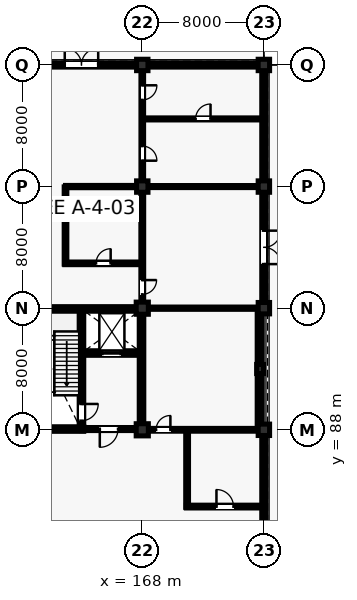
"""IFC4 building model, lengths in metres.
Left out: names, types, materials, properties, quantities, classifications, styles, units other than length and angle.
Written with IfcOpenShell. Run it as: python <this file> out.ifc"""

import sys

from ifc_helpers import new_model, si_unit, direction, frame, frame_2d, origin, origin_2d, place, context, subcontext, project, spatial, rectangle, extrude, element, fill, save


model = new_model("IFC4")
c1 = context("Model", 3, precision=1e-05, world=origin(), true_north=direction((0.0, 1.0)))
c2 = subcontext(c1, "Body", "Model", "MODEL_VIEW")
j1 = project(units=[si_unit("LENGTHUNIT", "METRE"), si_unit("PLANEANGLEUNIT", "RADIAN")], contexts=[c1])
p1 = place(None, origin())
s1 = spatial("IfcSite", under=j1, at=p1, CompositionType="ELEMENT")
p2 = place(p1, origin())
s2 = spatial("IfcBuilding", under=s1, at=p2, CompositionType="ELEMENT")
p3 = place(p2, origin())
s3 = spatial("IfcBuildingStorey", under=s2, at=p3, CompositionType="ELEMENT", Elevation=0.0)
for number, where, z_axis, x_axis in (
    (1, (168.0, 88.0, 0.0), (0.0, 0.0, 1.0), (1.0, 0.0, 0.0)),
    (2, (168.0, 96.0, 0.0), (0.0, 0.0, 1.0), (1.0, 0.0, 0.0)),
):
    element("IfcColumn", number, at=place(p3, frame(where, z_axis=z_axis, x_axis=x_axis)), inside=s3, PredefinedType="COLUMN", context=c2, shape_type="SweptSolid", body=[
        extrude(rectangle(XDim=0.8, YDim=0.8, at=origin_2d()), origin(), (0.0, 0.0, 1.0), 5.28),
    ])
for number, where, z_axis, x_axis in (
    (3, (168.0, 104.0, 0.0), (0.0, 0.0, 1.0), (1.0, 0.0, 0.0)),
    (4, (168.0, 112.0, 0.0), (0.0, 0.0, 1.0), (1.0, 0.0, 0.0)),
    (5, (176.0, 88.0, 0.0), (0.0, 0.0, 1.0), (1.0, 0.0, 0.0)),
    (6, (176.0, 96.0, 0.0), (0.0, 0.0, 1.0), (1.0, 0.0, 0.0)),
    (7, (176.0, 104.0, 0.0), (0.0, 0.0, 1.0), (1.0, 0.0, 0.0)),
    (8, (176.0, 112.0, 0.0), (0.0, 0.0, 1.0), (1.0, 0.0, 0.0)),
):
    element("IfcColumn", number, at=place(p3, frame(where, z_axis=z_axis, x_axis=x_axis)), inside=s3, PredefinedType="COLUMN", context=c2, shape_type="SweptSolid", body=[
        extrude(rectangle(XDim=0.75, YDim=0.75, at=origin_2d()), origin(), (0.0, 0.0, 1.0), 5.28),
    ])
p4 = place(p3, frame((175.75, 92.0, 0.0), z_axis=(0.0, 0.0, 1.0), x_axis=(1.0, 0.0, 0.0)))
e9 = element("IfcColumn", 9, at=p4, inside=s3, PredefinedType="PILASTER", context=c2, shape_type="SweptSolid", body=[
    extrude(rectangle(XDim=0.45, YDim=0.6, at=origin_2d()), origin(), (0.0, 0.0, 1.0), 5.28),
])
p5 = place(p3, frame((160.36, 112.0, 0.0), z_axis=(0.0, 0.0, 1.0), x_axis=(1.0, 0.0, 0.0)))
e10 = element("IfcWall", 10, at=p5, inside=s3, PredefinedType="SOLIDWALL", context=c2, shape_type="SweptSolid", body=[
    extrude(rectangle(XDim=7.28, YDim=0.28, at=frame_2d((3.64, 0.0))), origin(), (0.0, 0.0, 1.0), 4.614),
])
p6 = place(p5, frame((2.54, 0.0, 0.0)))
e11 = element("IfcOpeningElement", 11, at=p6, cuts=e10, PredefinedType="OPENING", context=c2, shape_type="SweptSolid", body=[
    extrude(rectangle(XDim=2.2, YDim=2.5, at=frame_2d((1.1, 1.25))), frame((0.0, 0.15, 0.0), z_axis=(0.0, -1.0, 0.0), x_axis=(1.0, 0.0, 0.0)), (0.0, 0.0, 1.0), 0.3),
])
p7 = place(p3, frame((176.0, 80.36, 0.0), z_axis=(0.0, 0.0, 1.0), x_axis=(0.0, 1.0, 0.0)))
e12 = element("IfcWall", 12, at=p7, inside=s3, PredefinedType="SOLIDWALL", context=c2, shape_type="SweptSolid", body=[
    extrude(rectangle(XDim=7.28, YDim=0.28, at=frame_2d((3.64, 0.0))), origin(), (0.0, 0.0, 1.0), 4.61),
])
p8 = place(p7, frame((0.635, 0.0, 0.95)))
e13 = element("IfcOpeningElement", 13, at=p8, cuts=e12, PredefinedType="OPENING", context=c2, shape_type="SweptSolid", body=[
    extrude(rectangle(XDim=1.35, YDim=1.9, at=frame_2d((0.675, 0.95))), frame((0.0, 0.15, 0.0), z_axis=(0.0, -1.0, 0.0), x_axis=(1.0, 0.0, 0.0)), (0.0, 0.0, 1.0), 0.3),
])
p9 = place(p7, frame((5.295, 0.0, 0.95)))
e14 = element("IfcOpeningElement", 14, at=p9, cuts=e12, PredefinedType="OPENING", context=c2, shape_type="SweptSolid", body=[
    extrude(rectangle(XDim=1.35, YDim=1.9, at=frame_2d((0.675, 0.95))), frame((0.0, 0.15, 0.0), z_axis=(0.0, -1.0, 0.0), x_axis=(1.0, 0.0, 0.0)), (0.0, 0.0, 1.0), 0.3),
])
p10 = place(p3, frame((175.7, 88.36, 0.0), z_axis=(0.0, 0.0, 1.0), x_axis=(0.0, 1.0, 0.0)))
e15 = element("IfcWall", 15, at=p10, inside=s3, PredefinedType="SOLIDWALL", context=c2, shape_type="SweptSolid", body=[
    extrude(rectangle(XDim=7.28, YDim=0.28, at=frame_2d((3.64, 0.0))), origin(), (0.0, 0.0, 1.0), 4.674),
])
p11 = place(p3, frame((176.0, 96.36, 0.0), z_axis=(0.0, 0.0, 1.0), x_axis=(0.0, 1.0, 0.0)))
e16 = element("IfcWall", 16, at=p11, inside=s3, PredefinedType="SOLIDWALL", context=c2, shape_type="SweptSolid", body=[
    extrude(rectangle(XDim=7.28, YDim=0.28, at=frame_2d((3.64, 0.0))), origin(), (0.0, 0.0, 1.0), 4.614),
])
p12 = place(p11, frame((2.54, 0.0, 0.0)))
e17 = element("IfcOpeningElement", 17, at=p12, cuts=e16, PredefinedType="OPENING", context=c2, shape_type="SweptSolid", body=[
    extrude(rectangle(XDim=2.2, YDim=2.5, at=frame_2d((1.1, 1.25))), frame((0.0, 0.15, 0.0), z_axis=(0.0, -1.0, 0.0), x_axis=(1.0, 0.0, 0.0)), (0.0, 0.0, 1.0), 0.3),
])
p13 = place(p3, frame((168.36, 112.0, 0.0), z_axis=(0.0, 0.0, 1.0), x_axis=(1.0, 0.0, 0.0)))
e18 = element("IfcWall", 18, at=p13, inside=s3, PredefinedType="SOLIDWALL", context=c2, shape_type="SweptSolid", body=[
    extrude(rectangle(XDim=7.28, YDim=0.28, at=frame_2d((3.64, 0.0))), origin(), (0.0, 0.0, 1.0), 4.677),
])
p14 = place(p13, frame((2.715, 0.0, 0.9)))
e19 = element("IfcOpeningElement", 19, at=p14, cuts=e18, PredefinedType="OPENING", context=c2, shape_type="SweptSolid", body=[
    extrude(rectangle(XDim=1.85, YDim=2.65, at=frame_2d((0.925, 1.325))), frame((0.0, 0.15, 0.0), z_axis=(0.0, -1.0, 0.0), x_axis=(1.0, 0.0, 0.0)), (0.0, 0.0, 1.0), 0.3),
])
p15 = place(p3, frame((176.0, 104.36, 0.0), z_axis=(0.0, 0.0, 1.0), x_axis=(0.0, 1.0, 0.0)))
e20 = element("IfcWall", 20, at=p15, inside=s3, PredefinedType="SOLIDWALL", context=c2, shape_type="SweptSolid", body=[
    extrude(rectangle(XDim=7.28, YDim=0.28, at=frame_2d((3.64, 0.0))), origin(), (0.0, 0.0, 1.0), 4.677),
])
p16 = place(p15, frame((0.735, 0.0, 0.95)))
e21 = element("IfcOpeningElement", 21, at=p16, cuts=e20, PredefinedType="OPENING", context=c2, shape_type="SweptSolid", body=[
    extrude(rectangle(XDim=1.15, YDim=1.65, at=frame_2d((0.575, 0.825))), frame((0.0, 0.15, 0.0), z_axis=(0.0, -1.0, 0.0), x_axis=(1.0, 0.0, 0.0)), (0.0, 0.0, 1.0), 0.3),
])
p17 = place(p15, frame((5.395, 0.0, 0.95)))
e22 = element("IfcOpeningElement", 22, at=p17, cuts=e20, PredefinedType="OPENING", context=c2, shape_type="SweptSolid", body=[
    extrude(rectangle(XDim=1.15, YDim=1.65, at=frame_2d((0.575, 0.825))), frame((0.0, 0.15, 0.0), z_axis=(0.0, -1.0, 0.0), x_axis=(1.0, 0.0, 0.0)), (0.0, 0.0, 1.0), 0.3),
])
for number, where, z_axis, x_axis in (
    (23, (160.29, 95.95, 0.0), (0.0, 0.0, 1.0), (1.0, 0.0, 0.0)),
    (24, (167.95, 88.29, 0.0), (0.0, 0.0, 1.0), (0.0, 1.0, 0.0)),
):
    element("IfcWall", number, at=place(p3, frame(where, z_axis=z_axis, x_axis=x_axis)), inside=s3, PredefinedType="SHEAR", context=c2, shape_type="SweptSolid", body=[
        extrude(rectangle(XDim=7.42, YDim=0.3, at=frame_2d((3.71, 0.0))), origin(), (0.0, 0.0, 1.0), 5.035),
    ])
p18 = place(p3, frame((160.29, 88.05, 0.0), z_axis=(0.0, 0.0, 1.0), x_axis=(1.0, 0.0, 0.0)))
e25 = element("IfcWall", 25, at=p18, inside=s3, PredefinedType="SHEAR", context=c2, shape_type="SweptSolid", body=[
    extrude(rectangle(XDim=3.86, YDim=0.3, at=frame_2d((1.93, 0.0))), origin(), (0.0, 0.0, 1.0), 5.035),
])
p19 = place(p3, frame((164.0, 88.05, 0.0), z_axis=(0.0, 0.0, 1.0), x_axis=(0.0, 1.0, 0.0)))
e26 = element("IfcWall", 26, at=p19, inside=s3, PredefinedType="SHEAR", context=c2, shape_type="SweptSolid", body=[
    extrude(rectangle(XDim=7.9, YDim=0.3, at=frame_2d((3.95, 0.0))), origin(), (0.0, 0.0, 1.0), 5.035),
])
p20 = place(p19, frame((0.55, 0.0, 0.0)))
e27 = element("IfcOpeningElement", 27, at=p20, cuts=e26, PredefinedType="OPENING", context=c2, shape_type="SweptSolid", body=[
    extrude(rectangle(XDim=1.1, YDim=2.15, at=frame_2d((0.55, 1.075))), frame((0.0, 0.16, 0.0), z_axis=(0.0, -1.0, 0.0), x_axis=(1.0, 0.0, 0.0)), (0.0, 0.0, 1.0), 0.32),
])
p21 = place(p3, frame((164.0, 93.05, 0.0), z_axis=(0.0, 0.0, 1.0), x_axis=(1.0, 0.0, 0.0)))
e28 = element("IfcWall", 28, at=p21, inside=s3, PredefinedType="SHEAR", context=c2, shape_type="SweptSolid", body=[
    extrude(rectangle(XDim=3.95, YDim=0.3, at=frame_2d((1.975, 0.0))), origin(), (0.0, 0.0, 1.0), 5.035),
])
p22 = place(p21, frame((1.375, 0.0, 0.0)))
e29 = element("IfcOpeningElement", 29, at=p22, cuts=e28, PredefinedType="OPENING", context=c2, shape_type="SweptSolid", body=[
    extrude(rectangle(XDim=1.2, YDim=2.2, at=frame_2d((0.6, 1.1))), frame((0.0, 0.16, 0.0), z_axis=(0.0, -1.0, 0.0), x_axis=(1.0, 0.0, 0.0)), (0.0, 0.0, 1.0), 0.32),
])
p23 = place(p3, frame((164.0, 88.05, 0.0), z_axis=(0.0, 0.0, 1.0), x_axis=(1.0, 0.0, 0.0)))
e30 = element("IfcWall", 30, at=p23, inside=s3, PredefinedType="PARTITIONING", context=c2, shape_type="SweptSolid", body=[
    extrude(rectangle(XDim=3.61, YDim=0.2, at=frame_2d((1.805, 0.0))), origin(), (0.0, 0.0, 1.0), 4.404),
])
p24 = place(p23, frame((1.205, 0.0, 0.0)))
e31 = element("IfcOpeningElement", 31, at=p24, cuts=e30, PredefinedType="OPENING", context=c2, shape_type="SweptSolid", body=[
    extrude(rectangle(XDim=1.2, YDim=2.15, at=frame_2d((0.6, 1.075))), frame((0.0, 0.11, 0.0), z_axis=(0.0, -1.0, 0.0), x_axis=(1.0, 0.0, 0.0)), (0.0, 0.0, 1.0), 0.22),
])
p25 = place(p3, frame((162.9, 98.95, 0.0), z_axis=(0.0, 0.0, 1.0), x_axis=(1.0, 0.0, 0.0)))
e32 = element("IfcWall", 32, at=p25, inside=s3, PredefinedType="PARTITIONING", context=c2, shape_type="SweptSolid", body=[
    extrude(rectangle(XDim=5.08, YDim=0.175, at=frame_2d((2.54, 0.0))), origin(), (0.0, 0.0, 1.0), 4.412),
])
p26 = place(p25, frame((2.06, 0.0, 0.0)))
e33 = element("IfcOpeningElement", 33, at=p26, cuts=e32, PredefinedType="OPENING", context=c2, shape_type="SweptSolid", body=[
    extrude(rectangle(XDim=0.96, YDim=2.14, at=frame_2d((0.48, 1.07))), frame((0.0, 0.097, 0.0), z_axis=(0.0, -1.0, 0.0), x_axis=(1.0, 0.0, 0.0)), (0.0, 0.0, 1.0), 0.195),
])
p27 = place(p3, frame((162.95, 98.9, 0.0), z_axis=(0.0, 0.0, 1.0), x_axis=(0.0, 1.0, 0.0)))
e34 = element("IfcWall", 34, at=p27, inside=s3, PredefinedType="PARTITIONING", context=c2, shape_type="SweptSolid", body=[
    extrude(rectangle(XDim=5.08, YDim=0.175, at=frame_2d((2.54, 0.0))), origin(), (0.0, 0.0, 1.0), 4.403),
])
p28 = place(p3, frame((162.95, 104.0, 0.0), z_axis=(0.0, 0.0, 1.0), x_axis=(1.0, 0.0, 0.0)))
e35 = element("IfcWall", 35, at=p28, inside=s3, PredefinedType="PARTITIONING", context=c2, shape_type="SweptSolid", body=[
    extrude(rectangle(XDim=4.665, YDim=0.15, at=frame_2d((2.333, 0.0))), origin(), (0.0, 0.0, 1.0), 4.403),
])
p29 = place(p3, frame((170.9, 82.95, 0.0), z_axis=(0.0, 0.0, 1.0), x_axis=(1.0, 0.0, 0.0)))
e36 = element("IfcWall", 36, at=p29, inside=s3, PredefinedType="PARTITIONING", context=c2, shape_type="SweptSolid", body=[
    extrude(rectangle(XDim=5.08, YDim=0.185, at=frame_2d((2.54, 0.0))), origin(), (0.0, 0.0, 1.0), 4.603),
])
p30 = place(p29, frame((1.98, 0.0, 0.0)))
e37 = element("IfcOpeningElement", 37, at=p30, cuts=e36, PredefinedType="OPENING", context=c2, shape_type="SweptSolid", body=[
    extrude(rectangle(XDim=1.12, YDim=2.22, at=frame_2d((0.56, 1.11))), frame((0.0, 0.103, 0.0), z_axis=(0.0, -1.0, 0.0), x_axis=(1.0, 0.0, 0.0)), (0.0, 0.0, 1.0), 0.205),
])
p31 = place(p3, frame((170.95, 82.9, 0.0), z_axis=(0.0, 0.0, 1.0), x_axis=(0.0, 1.0, 0.0)))
e38 = element("IfcWall", 38, at=p31, inside=s3, PredefinedType="PARTITIONING", context=c2, shape_type="SweptSolid", body=[
    extrude(rectangle(XDim=5.08, YDim=0.185, at=frame_2d((2.54, 0.0))), origin(), (0.0, 0.0, 1.0), 4.327),
])
p32 = place(p3, frame((168.0, 96.39, 0.0), z_axis=(0.0, 0.0, 1.0), x_axis=(0.0, 1.0, 0.0)))
e39 = element("IfcWall", 39, at=p32, inside=s3, PredefinedType="PARTITIONING", context=c2, shape_type="SweptSolid", body=[
    extrude(rectangle(XDim=7.245, YDim=0.185, at=frame_2d((3.623, 0.0))), origin(), (0.0, 0.0, 1.0), 4.412),
])
p33 = place(p32, frame((0.52, 0.0, 0.0)))
e40 = element("IfcOpeningElement", 40, at=p33, cuts=e39, PredefinedType="OPENING", context=c2, shape_type="SweptSolid", body=[
    extrude(rectangle(XDim=0.94, YDim=2.12, at=frame_2d((0.47, 1.06))), frame((0.0, 0.103, 0.0), z_axis=(0.0, -1.0, 0.0), x_axis=(1.0, 0.0, 0.0)), (0.0, 0.0, 1.0), 0.205),
])
p34 = place(p3, frame((168.0, 104.365, 0.0), z_axis=(0.0, 0.0, 1.0), x_axis=(0.0, 1.0, 0.0)))
e41 = element("IfcWall", 41, at=p34, inside=s3, PredefinedType="PARTITIONING", context=c2, shape_type="SweptSolid", body=[
    extrude(rectangle(XDim=7.27, YDim=0.175, at=frame_2d((3.635, 0.0))), origin(), (0.0, 0.0, 1.0), 4.404),
])
p35 = place(p34, frame((1.337, 0.0, 0.0)))
e42 = element("IfcOpeningElement", 42, at=p35, cuts=e41, PredefinedType="OPENING", context=c2, shape_type="SweptSolid", body=[
    extrude(rectangle(XDim=0.96, YDim=2.14, at=frame_2d((0.48, 1.07))), frame((0.0, 0.097, 0.0), z_axis=(0.0, -1.0, 0.0), x_axis=(1.0, 0.0, 0.0)), (0.0, 0.0, 1.0), 0.195),
])
p36 = place(p34, frame((5.336, 0.0, 0.0)))
e43 = element("IfcOpeningElement", 43, at=p36, cuts=e41, PredefinedType="OPENING", context=c2, shape_type="SweptSolid", body=[
    extrude(rectangle(XDim=0.96, YDim=2.14, at=frame_2d((0.48, 1.07))), frame((0.0, 0.097, 0.0), z_axis=(0.0, -1.0, 0.0), x_axis=(1.0, 0.0, 0.0)), (0.0, 0.0, 1.0), 0.195),
])
p37 = place(p3, frame((168.39, 88.0, 0.0), z_axis=(0.0, 0.0, 1.0), x_axis=(1.0, 0.0, 0.0)))
e44 = element("IfcWall", 44, at=p37, inside=s3, PredefinedType="PARTITIONING", context=c2, shape_type="SweptSolid", body=[
    extrude(rectangle(XDim=7.245, YDim=0.185, at=frame_2d((3.623, 0.0))), origin(), (0.0, 0.0, 1.0), 4.327),
])
p38 = place(p37, frame((0.52, 0.0, 0.0)))
e45 = element("IfcOpeningElement", 45, at=p38, cuts=e44, PredefinedType="OPENING", context=c2, shape_type="SweptSolid", body=[
    extrude(rectangle(XDim=0.94, YDim=2.12, at=frame_2d((0.47, 1.06))), frame((0.0, 0.103, 0.0), z_axis=(0.0, -1.0, 0.0), x_axis=(1.0, 0.0, 0.0)), (0.0, 0.0, 1.0), 0.205),
])
p39 = place(p3, frame((168.39, 96.0, 0.0), z_axis=(0.0, 0.0, 1.0), x_axis=(1.0, 0.0, 0.0)))
e46 = element("IfcWall", 46, at=p39, inside=s3, PredefinedType="PARTITIONING", context=c2, shape_type="SweptSolid", body=[
    extrude(rectangle(XDim=7.245, YDim=0.15, at=frame_2d((3.623, 0.0))), origin(), (0.0, 0.0, 1.0), 4.403),
])
p40 = place(p3, frame((168.365, 104.0, 0.0), z_axis=(0.0, 0.0, 1.0), x_axis=(1.0, 0.0, 0.0)))
e47 = element("IfcWall", 47, at=p40, inside=s3, PredefinedType="PARTITIONING", context=c2, shape_type="SweptSolid", body=[
    extrude(rectangle(XDim=7.27, YDim=0.135, at=frame_2d((3.635, 0.0))), origin(), (0.0, 0.0, 1.0), 4.336),
])
p41 = place(p3, frame((168.02, 108.45, 0.0), z_axis=(0.0, 0.0, 1.0), x_axis=(1.0, 0.0, 0.0)))
e48 = element("IfcWall", 48, at=p41, inside=s3, PredefinedType="PARTITIONING", context=c2, shape_type="SweptSolid", body=[
    extrude(rectangle(XDim=7.96, YDim=0.135, at=frame_2d((3.98, 0.0))), origin(), (0.0, 0.0, 1.0), 4.404),
])
p42 = place(p41, frame((3.49, 0.0, 0.0)))
e49 = element("IfcOpeningElement", 49, at=p42, cuts=e48, PredefinedType="OPENING", context=c2, shape_type="SweptSolid", body=[
    extrude(rectangle(XDim=0.98, YDim=2.15, at=frame_2d((0.49, 1.075))), frame((0.0, 0.077, 0.0), z_axis=(0.0, -1.0, 0.0), x_axis=(1.0, 0.0, 0.0)), (0.0, 0.0, 1.0), 0.155),
])
p43 = place(p6, origin())
e50 = element("IfcDoor", 50, at=p43, inside=s3, OperationType="DOUBLE_DOOR_SINGLE_SWING", PredefinedType="DOOR", context=c2, shape_type="SweptSolid", body=[
    extrude(rectangle(XDim=2.2, YDim=2.5, at=frame_2d((1.1, 1.25))), frame((0.0, 0.025, 0.0), z_axis=(0.0, -1.0, 0.0), x_axis=(1.0, 0.0, 0.0)), (0.0, 0.0, 1.0), 0.05),
])
fill(e11, e50)
p44 = place(p8, origin())
e51 = element("IfcWindow", 51, at=p44, inside=s3, PartitioningType="SINGLE_PANEL", PredefinedType="WINDOW", context=c2, shape_type="SweptSolid", body=[
    extrude(rectangle(XDim=1.35, YDim=1.9, at=frame_2d((0.675, 0.95))), frame((0.0, 0.03, 0.0), z_axis=(0.0, -1.0, 0.0), x_axis=(1.0, 0.0, 0.0)), (0.0, 0.0, 1.0), 0.06),
])
fill(e13, e51)
p45 = place(p9, origin())
e52 = element("IfcWindow", 52, at=p45, inside=s3, PartitioningType="SINGLE_PANEL", PredefinedType="WINDOW", context=c2, shape_type="SweptSolid", body=[
    extrude(rectangle(XDim=1.35, YDim=1.9, at=frame_2d((0.675, 0.95))), frame((0.0, 0.03, 0.0), z_axis=(0.0, -1.0, 0.0), x_axis=(1.0, 0.0, 0.0)), (0.0, 0.0, 1.0), 0.06),
])
fill(e14, e52)
p46 = place(p12, frame((2.2, 0.0, 0.0), z_axis=(0.0, 0.0, 1.0), x_axis=(-1.0, 0.0, 0.0)))
e53 = element("IfcDoor", 53, at=p46, inside=s3, OperationType="DOUBLE_DOOR_SINGLE_SWING", PredefinedType="DOOR", context=c2, shape_type="SweptSolid", body=[
    extrude(rectangle(XDim=2.2, YDim=2.5, at=frame_2d((1.1, 1.25))), frame((0.0, 0.025, 0.0), z_axis=(0.0, -1.0, 0.0), x_axis=(1.0, 0.0, 0.0)), (0.0, 0.0, 1.0), 0.05),
])
fill(e17, e53)
p47 = place(p14, origin())
e54 = element("IfcWindow", 54, at=p47, inside=s3, PartitioningType="SINGLE_PANEL", PredefinedType="WINDOW", context=c2, shape_type="SweptSolid", body=[
    extrude(rectangle(XDim=1.85, YDim=2.65, at=frame_2d((0.925, 1.325))), frame((0.0, 0.03, 0.0), z_axis=(0.0, -1.0, 0.0), x_axis=(1.0, 0.0, 0.0)), (0.0, 0.0, 1.0), 0.06),
])
fill(e19, e54)
p48 = place(p16, origin())
e55 = element("IfcWindow", 55, at=p48, inside=s3, PartitioningType="SINGLE_PANEL", PredefinedType="WINDOW", context=c2, shape_type="SweptSolid", body=[
    extrude(rectangle(XDim=1.15, YDim=1.65, at=frame_2d((0.575, 0.825))), frame((0.0, 0.03, 0.0), z_axis=(0.0, -1.0, 0.0), x_axis=(1.0, 0.0, 0.0)), (0.0, 0.0, 1.0), 0.06),
])
fill(e21, e55)
p49 = place(p17, origin())
e56 = element("IfcWindow", 56, at=p49, inside=s3, PartitioningType="SINGLE_PANEL", PredefinedType="WINDOW", context=c2, shape_type="SweptSolid", body=[
    extrude(rectangle(XDim=1.15, YDim=1.65, at=frame_2d((0.575, 0.825))), frame((0.0, 0.03, 0.0), z_axis=(0.0, -1.0, 0.0), x_axis=(1.0, 0.0, 0.0)), (0.0, 0.0, 1.0), 0.06),
])
fill(e22, e56)
p50 = place(p20, frame((1.1, 0.0, 0.0), z_axis=(0.0, 0.0, 1.0), x_axis=(-1.0, 0.0, 0.0)))
e57 = element("IfcDoor", 57, at=p50, inside=s3, OperationType="SINGLE_SWING_RIGHT", PredefinedType="DOOR", context=c2, shape_type="SweptSolid", body=[
    extrude(rectangle(XDim=1.1, YDim=2.15, at=frame_2d((0.55, 1.075))), frame((0.0, 0.025, 0.0), z_axis=(0.0, -1.0, 0.0), x_axis=(1.0, 0.0, 0.0)), (0.0, 0.0, 1.0), 0.05),
])
fill(e27, e57)
p51 = place(p22, origin())
e58 = element("IfcDoor", 58, at=p51, inside=s3, OperationType="SLIDING_TO_LEFT", PredefinedType="DOOR", context=c2, shape_type="SweptSolid", body=[
    extrude(rectangle(XDim=1.2, YDim=2.2, at=frame_2d((0.6, 1.1))), frame((0.0, 0.025, 0.0), z_axis=(0.0, -1.0, 0.0), x_axis=(1.0, 0.0, 0.0)), (0.0, 0.0, 1.0), 0.05),
])
fill(e29, e58)
p52 = place(p24, frame((1.2, 0.0, 0.0), z_axis=(0.0, 0.0, 1.0), x_axis=(-1.0, 0.0, 0.0)))
e59 = element("IfcDoor", 59, at=p52, inside=s3, OperationType="SINGLE_SWING_LEFT", PredefinedType="DOOR", context=c2, shape_type="SweptSolid", body=[
    extrude(rectangle(XDim=1.2, YDim=2.15, at=frame_2d((0.6, 1.075))), frame((0.0, 0.025, 0.0), z_axis=(0.0, -1.0, 0.0), x_axis=(1.0, 0.0, 0.0)), (0.0, 0.0, 1.0), 0.05),
])
fill(e31, e59)
p53 = place(p26, origin())
e60 = element("IfcDoor", 60, at=p53, inside=s3, OperationType="SINGLE_SWING_RIGHT", PredefinedType="DOOR", context=c2, shape_type="SweptSolid", body=[
    extrude(rectangle(XDim=0.96, YDim=2.14, at=frame_2d((0.48, 1.07))), frame((0.0, 0.025, 0.0), z_axis=(0.0, -1.0, 0.0), x_axis=(1.0, 0.0, 0.0)), (0.0, 0.0, 1.0), 0.05),
])
fill(e33, e60)
p54 = place(p30, origin())
e61 = element("IfcDoor", 61, at=p54, inside=s3, OperationType="SINGLE_SWING_LEFT", PredefinedType="DOOR", context=c2, shape_type="SweptSolid", body=[
    extrude(rectangle(XDim=1.12, YDim=2.22, at=frame_2d((0.56, 1.11))), frame((0.0, 0.025, 0.0), z_axis=(0.0, -1.0, 0.0), x_axis=(1.0, 0.0, 0.0)), (0.0, 0.0, 1.0), 0.05),
])
fill(e37, e61)
p55 = place(p33, frame((0.94, 0.0, 0.0), z_axis=(0.0, 0.0, 1.0), x_axis=(-1.0, 0.0, 0.0)))
e62 = element("IfcDoor", 62, at=p55, inside=s3, OperationType="SINGLE_SWING_RIGHT", PredefinedType="DOOR", context=c2, shape_type="SweptSolid", body=[
    extrude(rectangle(XDim=0.94, YDim=2.12, at=frame_2d((0.47, 1.06))), frame((0.0, 0.025, 0.0), z_axis=(0.0, -1.0, 0.0), x_axis=(1.0, 0.0, 0.0)), (0.0, 0.0, 1.0), 0.05),
])
fill(e40, e62)
p56 = place(p35, frame((0.96, 0.0, 0.0), z_axis=(0.0, 0.0, 1.0), x_axis=(-1.0, 0.0, 0.0)))
e63 = element("IfcDoor", 63, at=p56, inside=s3, OperationType="SINGLE_SWING_LEFT", PredefinedType="DOOR", context=c2, shape_type="SweptSolid", body=[
    extrude(rectangle(XDim=0.96, YDim=2.14, at=frame_2d((0.48, 1.07))), frame((0.0, 0.025, 0.0), z_axis=(0.0, -1.0, 0.0), x_axis=(1.0, 0.0, 0.0)), (0.0, 0.0, 1.0), 0.05),
])
fill(e42, e63)
p57 = place(p36, frame((0.96, 0.0, 0.0), z_axis=(0.0, 0.0, 1.0), x_axis=(-1.0, 0.0, 0.0)))
e64 = element("IfcDoor", 64, at=p57, inside=s3, OperationType="SINGLE_SWING_RIGHT", PredefinedType="DOOR", context=c2, shape_type="SweptSolid", body=[
    extrude(rectangle(XDim=0.96, YDim=2.14, at=frame_2d((0.48, 1.07))), frame((0.0, 0.025, 0.0), z_axis=(0.0, -1.0, 0.0), x_axis=(1.0, 0.0, 0.0)), (0.0, 0.0, 1.0), 0.05),
])
fill(e43, e64)
p58 = place(p38, origin())
e65 = element("IfcDoor", 65, at=p58, inside=s3, OperationType="SINGLE_SWING_RIGHT", PredefinedType="DOOR", context=c2, shape_type="SweptSolid", body=[
    extrude(rectangle(XDim=0.94, YDim=2.12, at=frame_2d((0.47, 1.06))), frame((0.0, 0.025, 0.0), z_axis=(0.0, -1.0, 0.0), x_axis=(1.0, 0.0, 0.0)), (0.0, 0.0, 1.0), 0.05),
])
fill(e45, e65)
p59 = place(p42, origin())
e66 = element("IfcDoor", 66, at=p59, inside=s3, OperationType="SINGLE_SWING_RIGHT", PredefinedType="DOOR", context=c2, shape_type="SweptSolid", body=[
    extrude(rectangle(XDim=0.98, YDim=2.15, at=frame_2d((0.49, 1.075))), frame((0.0, 0.025, 0.0), z_axis=(0.0, -1.0, 0.0), x_axis=(1.0, 0.0, 0.0)), (0.0, 0.0, 1.0), 0.05),
])
fill(e49, e66)
save(model, sys.argv[1])
